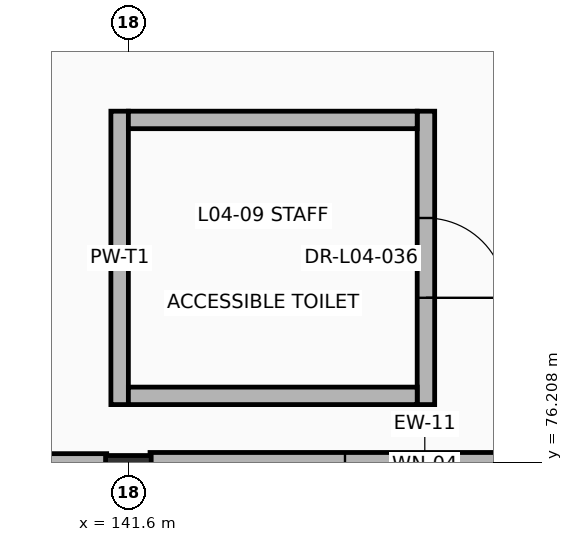
"""IFC4 building model, lengths in metres.
Left out: names, types, materials, properties, quantities, classifications, styles, units other than length and angle.
Written with IfcOpenShell. Run it as: python <this file> out.ifc"""

import sys

from ifc_helpers import new_model, si_unit, direction, frame, frame_2d, origin, origin_2d, place, context, subcontext, project, spatial, rectangle, extrude, element, fill, save


model = new_model("IFC4")
c1 = context("Model", 3, precision=1e-05, world=origin(), true_north=direction((0.0, 1.0)))
c2 = subcontext(c1, "Body", "Model", "MODEL_VIEW")
j1 = project(units=[si_unit("LENGTHUNIT", "METRE"), si_unit("PLANEANGLEUNIT", "RADIAN")], contexts=[c1])
p1 = place(None, origin())
s1 = spatial("IfcSite", under=j1, at=p1, CompositionType="ELEMENT")
p2 = place(p1, origin())
s2 = spatial("IfcBuilding", under=s1, at=p2, CompositionType="ELEMENT")
p3 = place(p2, frame((0.0, 0.0, 15.3)))
s3 = spatial("IfcBuildingStorey", under=s2, at=p3, CompositionType="ELEMENT", Elevation=15.3)
p4 = place(p3, frame((141.6, 76.0, 0.0), z_axis=(0.0, 0.0, 1.0), x_axis=(1.0, 0.0, 0.0)))
e1 = element("IfcColumn", 1, at=p4, inside=s3, PredefinedType="COLUMN", context=c2, shape_type="SweptSolid", body=[
    extrude(rectangle(XDim=0.6, YDim=0.6, at=origin_2d()), origin(), (0.0, 0.0, 1.0), 4.5),
])
p5 = place(p3, frame((149.115, 76.17, 0.0), z_axis=(0.0, 0.0, 1.0), x_axis=(-1.0, 0.0, 0.0)))
e2 = element("IfcWall", 2, at=p5, inside=s3, PredefinedType="SOLIDWALL", context=c2, shape_type="SweptSolid", body=[
    extrude(rectangle(XDim=7.23, YDim=0.34, at=frame_2d((3.615, 0.0))), origin(), (0.0, 0.0, 1.0), 3.955),
])
p6 = place(p5, frame((2.565, 0.0, 0.95)))
e3 = element("IfcOpeningElement", 3, at=p6, cuts=e2, PredefinedType="OPENING", context=c2, shape_type="SweptSolid", body=[
    extrude(rectangle(XDim=2.1, YDim=2.0, at=frame_2d((1.05, 1.0))), frame((0.0, 0.18, 0.0), z_axis=(0.0, -1.0, 0.0), x_axis=(1.0, 0.0, 0.0)), (0.0, 0.0, 1.0), 0.36),
])
p7 = place(p3, frame((141.315, 76.162, 0.0), z_axis=(0.0, 0.0, 1.0), x_axis=(-1.0, 0.0, 0.0)))
e4 = element("IfcWall", 4, at=p7, inside=s3, PredefinedType="SOLIDWALL", context=c2, shape_type="SweptSolid", body=[
    extrude(rectangle(XDim=7.23, YDim=0.325, at=frame_2d((3.615, 0.0))), origin(), (0.0, 0.0, 1.0), 4.055),
])
p8 = place(p7, frame((2.865, 0.0, 0.95)))
e5 = element("IfcOpeningElement", 5, at=p8, cuts=e4, PredefinedType="OPENING", context=c2, shape_type="SweptSolid", body=[
    extrude(rectangle(XDim=1.5, YDim=1.8, at=frame_2d((0.75, 0.9))), frame((0.0, 0.172, 0.0), z_axis=(0.0, -1.0, 0.0), x_axis=(1.0, 0.0, 0.0)), (0.0, 0.0, 1.0), 0.345),
])
p9 = place(p3, frame((141.485, 76.97, 0.0), z_axis=(0.0, 0.0, 1.0), x_axis=(0.0, 1.0, 0.0)))
e6 = element("IfcWall", 6, at=p9, inside=s3, PredefinedType="PLUMBINGWALL", context=c2, shape_type="SweptSolid", body=[
    extrude(rectangle(XDim=3.86, YDim=0.23, at=frame_2d((1.93, 0.0))), origin(), (0.0, 0.0, 1.0), 3.786),
])
p10 = place(p3, frame((145.515, 76.97, 0.0), z_axis=(0.0, 0.0, 1.0), x_axis=(0.0, 1.0, 0.0)))
e7 = element("IfcWall", 7, at=p10, inside=s3, PredefinedType="PLUMBINGWALL", context=c2, shape_type="SweptSolid", body=[
    extrude(rectangle(XDim=3.86, YDim=0.23, at=frame_2d((1.93, 0.0))), origin(), (0.0, 0.0, 1.0), 3.901),
])
p11 = place(p10, frame((1.405, 0.0, 0.0)))
e8 = element("IfcOpeningElement", 8, at=p11, cuts=e7, PredefinedType="OPENING", context=c2, shape_type="SweptSolid", body=[
    extrude(rectangle(XDim=1.05, YDim=2.1, at=frame_2d((0.525, 1.05))), frame((0.0, 0.125, 0.0), z_axis=(0.0, -1.0, 0.0), x_axis=(1.0, 0.0, 0.0)), (0.0, 0.0, 1.0), 0.25),
])
for number, where, z_axis, x_axis in (
    (9, (141.6, 77.085, 0.0), (0.0, 0.0, 1.0), (1.0, 0.0, 0.0)),
    (10, (141.6, 80.715, 0.0), (0.0, 0.0, 1.0), (1.0, 0.0, 0.0)),
):
    element("IfcWall", number, at=place(p3, frame(where, z_axis=z_axis, x_axis=x_axis)), inside=s3, PredefinedType="PLUMBINGWALL", context=c2, shape_type="SweptSolid", body=[
        extrude(rectangle(XDim=3.8, YDim=0.23, at=frame_2d((1.9, 0.0))), origin(), (0.0, 0.0, 1.0), 3.786),
    ])
p12 = place(p11, origin())
e11 = element("IfcDoor", 11, at=p12, inside=s3, OperationType="SINGLE_SWING_RIGHT", PredefinedType="DOOR", context=c2, shape_type="SweptSolid", body=[
    extrude(rectangle(XDim=1.05, YDim=2.1, at=frame_2d((0.525, 1.05))), frame((0.0, 0.025, 0.0), z_axis=(0.0, -1.0, 0.0), x_axis=(1.0, 0.0, 0.0)), (0.0, 0.0, 1.0), 0.05),
])
fill(e8, e11)
save(model, sys.argv[1])
